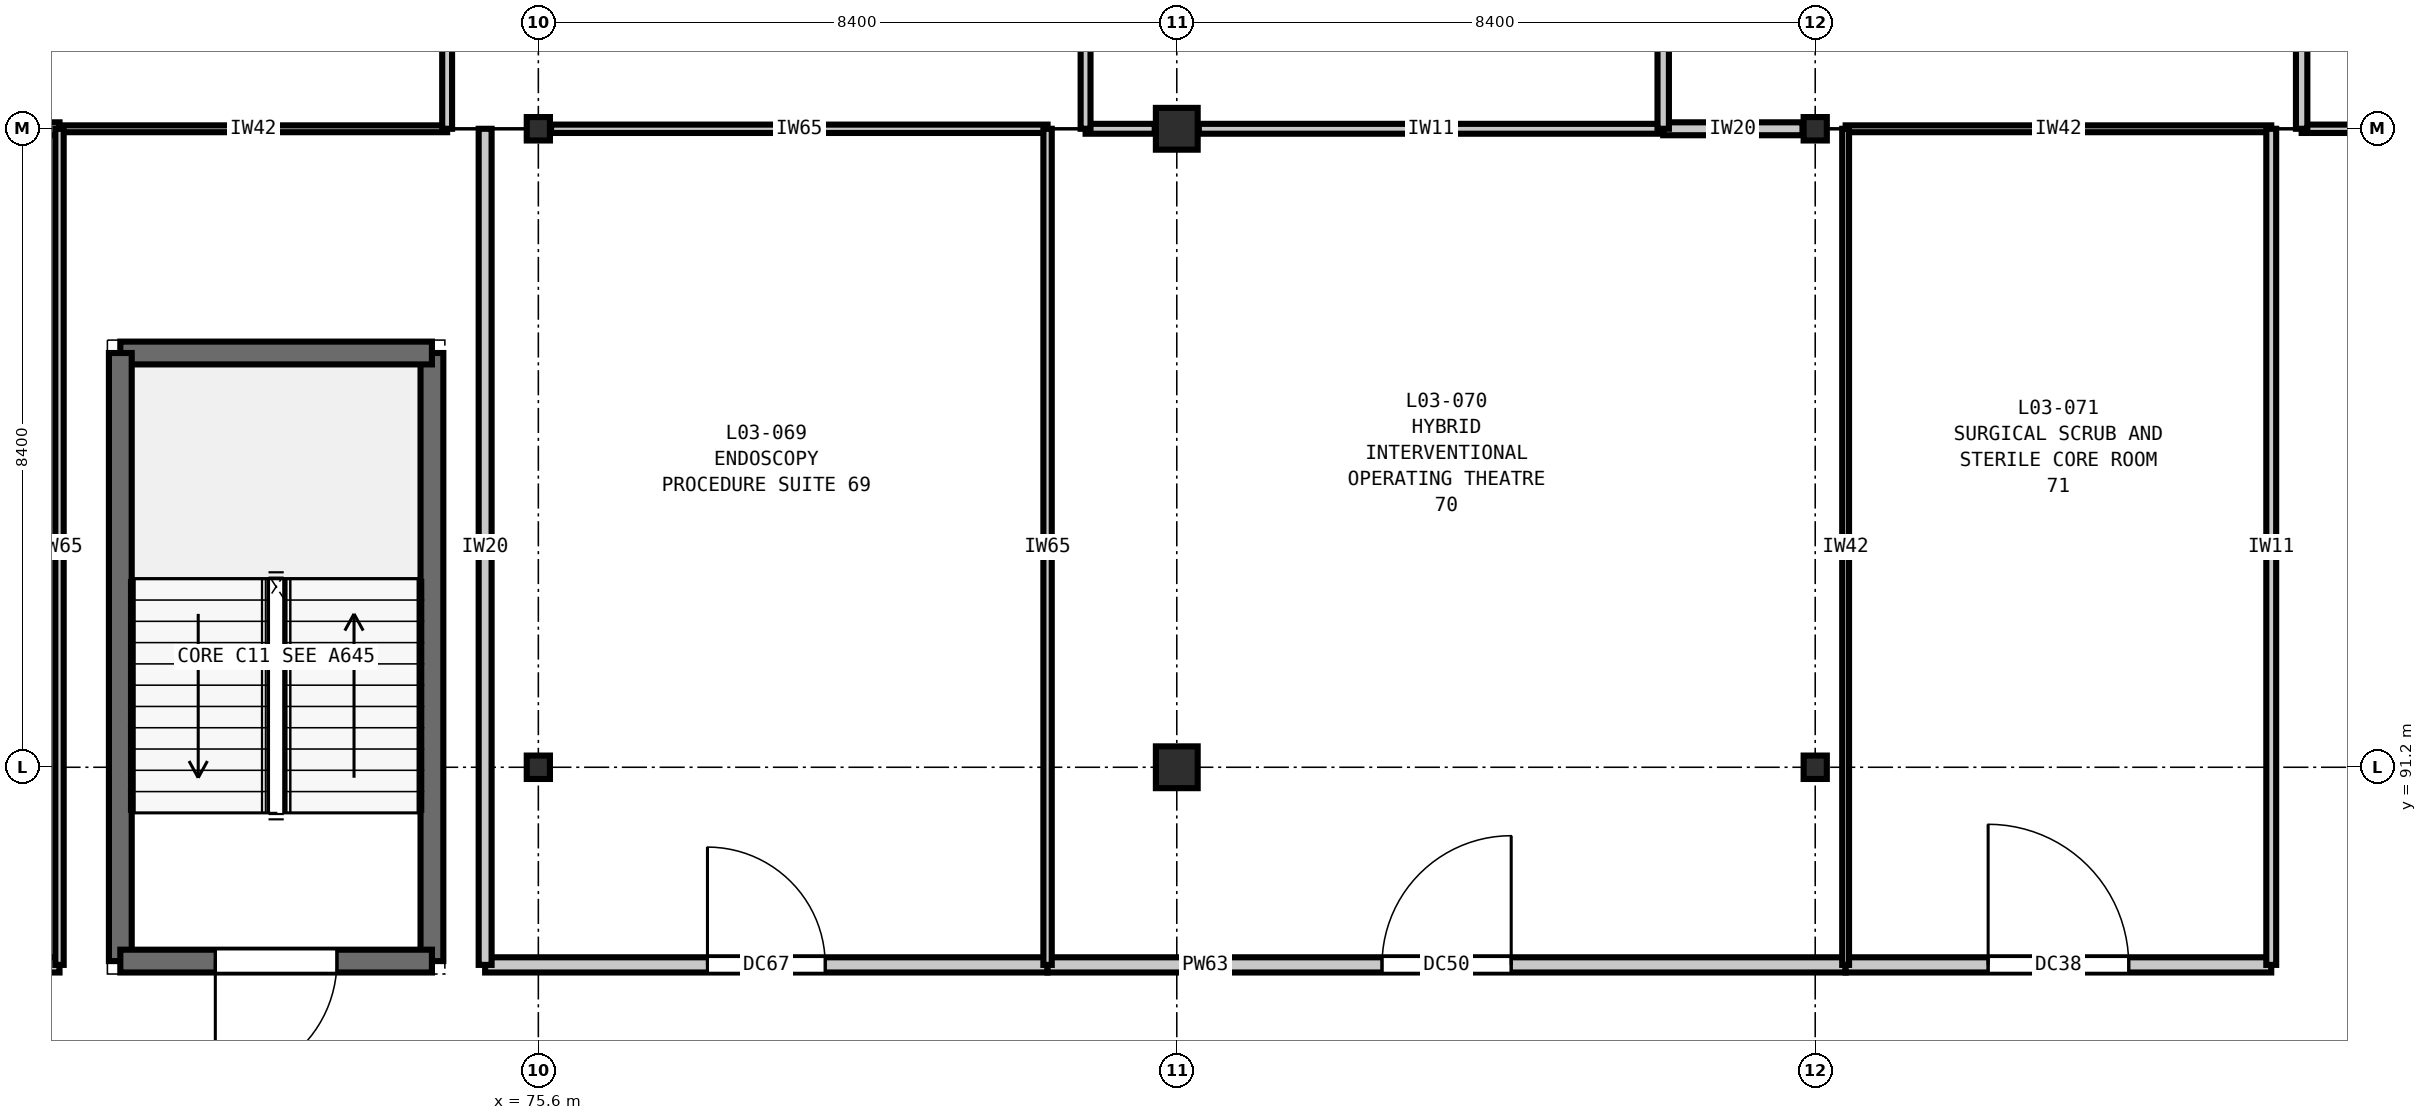
"""IFC4 building model, lengths in metres.
Left out: names, types, materials, properties, quantities, classifications, styles, units other than length and angle.
Written with IfcOpenShell. Run it as: python <this file> out.ifc"""

import sys

from ifc_helpers import new_model, si_unit, direction, frame, frame_2d, origin, origin_2d, place, context, subcontext, project, spatial, rectangle, i_section, extrude, element, fill, save


model = new_model("IFC4")
c1 = context("Model", 3, precision=1e-05, world=origin(), true_north=direction((0.0, 1.0)))
c2 = subcontext(c1, "Body", "Model", "MODEL_VIEW")
j1 = project(units=[si_unit("LENGTHUNIT", "METRE"), si_unit("PLANEANGLEUNIT", "RADIAN")], contexts=[c1])
p1 = place(None, origin())
s1 = spatial("IfcSite", under=j1, at=p1, CompositionType="ELEMENT")
p2 = place(p1, origin())
s2 = spatial("IfcBuilding", under=s1, at=p2, CompositionType="ELEMENT")
p3 = place(p2, frame((0.0, 0.0, 16.2)))
s3 = spatial("IfcBuildingStorey", under=s2, at=p3, CompositionType="ELEMENT", Elevation=16.2)
for number, where, z_axis, x_axis in (
    (1, (75.6, 91.2, 0.0), (0.0, 0.0, 1.0), (1.0, 0.0, 0.0)),
    (2, (75.6, 99.6, 0.0), (0.0, 0.0, 1.0), (1.0, 0.0, 0.0)),
):
    element("IfcColumn", number, at=place(p3, frame(where, z_axis=z_axis, x_axis=x_axis)), inside=s3, PredefinedType="COLUMN", context=c2, shape_type="SweptSolid", body=[
        extrude(i_section(OverallWidth=0.305, OverallDepth=0.308, WebThickness=0.01, FlangeThickness=0.015, FilletRadius=0.015, at=origin_2d()), origin(), (0.0, 0.0, 1.0), 4.2),
    ])
for number, where, z_axis, x_axis in (
    (3, (84.0, 91.2, 0.0), (0.0, 0.0, 1.0), (1.0, 0.0, 0.0)),
    (4, (84.0, 99.6, 0.0), (0.0, 0.0, 1.0), (1.0, 0.0, 0.0)),
):
    element("IfcColumn", number, at=place(p3, frame(where, z_axis=z_axis, x_axis=x_axis)), inside=s3, PredefinedType="COLUMN", context=c2, shape_type="SweptSolid", body=[
        extrude(rectangle(XDim=0.55, YDim=0.55, at=origin_2d()), origin(), (0.0, 0.0, 1.0), 4.2),
    ])
for number, where, z_axis, x_axis in (
    (5, (92.4, 91.2, 0.0), (0.0, 0.0, 1.0), (1.0, 0.0, 0.0)),
    (6, (92.4, 99.6, 0.0), (0.0, 0.0, 1.0), (1.0, 0.0, 0.0)),
):
    element("IfcColumn", number, at=place(p3, frame(where, z_axis=z_axis, x_axis=x_axis)), inside=s3, PredefinedType="COLUMN", context=c2, shape_type="SweptSolid", body=[
        extrude(i_section(OverallWidth=0.305, OverallDepth=0.308, WebThickness=0.01, FlangeThickness=0.015, FilletRadius=0.015, at=origin_2d()), origin(), (0.0, 0.0, 1.0), 4.2),
    ])
p4 = place(p3, frame((74.2, 88.65, 0.0), z_axis=(0.0, 0.0, 1.0), x_axis=(0.0, 1.0, 0.0)))
e7 = element("IfcWall", 7, at=p4, inside=s3, PredefinedType="SHEAR", context=c2, shape_type="SweptSolid", body=[
    extrude(rectangle(XDim=8.0, YDim=0.3, at=frame_2d((4.0, 0.0))), origin(), (0.0, 0.0, 1.0), 4.2),
])
p5 = place(p3, frame((74.2, 96.65, 0.0), z_axis=(0.0, 0.0, 1.0), x_axis=(-1.0, 0.0, 0.0)))
e8 = element("IfcWall", 8, at=p5, inside=s3, PredefinedType="SHEAR", context=c2, shape_type="SweptSolid", body=[
    extrude(rectangle(XDim=4.1, YDim=0.3, at=frame_2d((2.05, 0.0))), origin(), (0.0, 0.0, 1.0), 4.2),
])
p6 = place(p3, frame((70.1, 96.65, 0.0), z_axis=(0.0, 0.0, 1.0), x_axis=(0.0, -1.0, 0.0)))
e9 = element("IfcWall", 9, at=p6, inside=s3, PredefinedType="SHEAR", context=c2, shape_type="SweptSolid", body=[
    extrude(rectangle(XDim=8.0, YDim=0.3, at=frame_2d((4.0, 0.0))), origin(), (0.0, 0.0, 1.0), 4.2),
])
p7 = place(p3, frame((70.1, 88.65, 0.0), z_axis=(0.0, 0.0, 1.0), x_axis=(1.0, 0.0, 0.0)))
e10 = element("IfcWall", 10, at=p7, inside=s3, PredefinedType="SHEAR", context=c2, shape_type="SweptSolid", body=[
    extrude(rectangle(XDim=4.1, YDim=0.3, at=frame_2d((2.05, 0.0))), origin(), (0.0, 0.0, 1.0), 4.2),
])
p8 = place(p7, frame((1.25, 0.0, 0.0)))
e11 = element("IfcOpeningElement", 11, at=p8, cuts=e10, PredefinedType="OPENING", context=c2, shape_type="SweptSolid", body=[
    extrude(rectangle(XDim=1.6, YDim=2.25, at=frame_2d((0.8, 1.125))), frame((0.0, 0.16, 0.0), z_axis=(0.0, -1.0, 0.0), x_axis=(1.0, 0.0, 0.0)), (0.0, 0.0, 1.0), 0.32),
])
p9 = place(p3, frame((58.8, 88.6, 0.0), z_axis=(0.0, 0.0, 1.0), x_axis=(1.0, 0.0, 0.0)))
e12 = element("IfcWall", 12, at=p9, inside=s3, PredefinedType="PARTITIONING", context=c2, shape_type="SweptSolid", body=[
    extrude(rectangle(XDim=10.5, YDim=0.2, at=frame_2d((5.25, 0.0))), origin(), (0.0, 0.0, 1.0), 3.89),
])
p10 = place(p9, frame((4.525, 0.0, 0.0)))
e13 = element("IfcOpeningElement", 13, at=p10, cuts=e12, PredefinedType="OPENING", context=c2, shape_type="SweptSolid", body=[
    extrude(rectangle(XDim=1.45, YDim=2.25, at=frame_2d((0.725, 1.125))), frame((0.0, 0.11, 0.0), z_axis=(0.0, -1.0, 0.0), x_axis=(1.0, 0.0, 0.0)), (0.0, 0.0, 1.0), 0.22),
])
p11 = place(p3, frame((74.9, 88.6, 0.0), z_axis=(0.0, 0.0, 1.0), x_axis=(1.0, 0.0, 0.0)))
e14 = element("IfcWall", 14, at=p11, inside=s3, PredefinedType="PARTITIONING", context=c2, shape_type="SweptSolid", body=[
    extrude(rectangle(XDim=7.4, YDim=0.2, at=frame_2d((3.7, 0.0))), origin(), (0.0, 0.0, 1.0), 3.89),
])
p12 = place(p11, frame((2.925, 0.0, 0.0)))
e15 = element("IfcOpeningElement", 15, at=p12, cuts=e14, PredefinedType="OPENING", context=c2, shape_type="SweptSolid", body=[
    extrude(rectangle(XDim=1.55, YDim=2.25, at=frame_2d((0.775, 1.125))), frame((0.0, 0.11, 0.0), z_axis=(0.0, -1.0, 0.0), x_axis=(1.0, 0.0, 0.0)), (0.0, 0.0, 1.0), 0.22),
])
p13 = place(p3, frame((82.3, 88.6, 0.0), z_axis=(0.0, 0.0, 1.0), x_axis=(1.0, 0.0, 0.0)))
e16 = element("IfcWall", 16, at=p13, inside=s3, PredefinedType="PARTITIONING", context=c2, shape_type="SweptSolid", body=[
    extrude(rectangle(XDim=10.5, YDim=0.2, at=frame_2d((5.25, 0.0))), origin(), (0.0, 0.0, 1.0), 3.89),
])
p14 = place(p13, frame((4.4, 0.0, 0.0)))
e17 = element("IfcOpeningElement", 17, at=p14, cuts=e16, PredefinedType="OPENING", context=c2, shape_type="SweptSolid", body=[
    extrude(rectangle(XDim=1.7, YDim=2.3, at=frame_2d((0.85, 1.15))), frame((0.0, 0.11, 0.0), z_axis=(0.0, -1.0, 0.0), x_axis=(1.0, 0.0, 0.0)), (0.0, 0.0, 1.0), 0.22),
])
p15 = place(p3, frame((92.8, 88.6, 0.0), z_axis=(0.0, 0.0, 1.0), x_axis=(1.0, 0.0, 0.0)))
e18 = element("IfcWall", 18, at=p15, inside=s3, PredefinedType="PARTITIONING", context=c2, shape_type="SweptSolid", body=[
    extrude(rectangle(XDim=5.6, YDim=0.2, at=frame_2d((2.8, 0.0))), origin(), (0.0, 0.0, 1.0), 3.89),
])
p16 = place(p15, frame((1.875, 0.0, 0.0)))
e19 = element("IfcOpeningElement", 19, at=p16, cuts=e18, PredefinedType="OPENING", context=c2, shape_type="SweptSolid", body=[
    extrude(rectangle(XDim=1.85, YDim=2.3, at=frame_2d((0.925, 1.15))), frame((0.0, 0.11, 0.0), z_axis=(0.0, -1.0, 0.0), x_axis=(1.0, 0.0, 0.0)), (0.0, 0.0, 1.0), 0.22),
])
p17 = place(p3, frame((67.49, 99.6, 0.0), z_axis=(0.0, 0.0, 1.0), x_axis=(1.0, 0.0, 0.0)))
e20 = element("IfcWall", 20, at=p17, inside=s3, PredefinedType="PARTITIONING", context=c2, shape_type="SweptSolid", body=[
    extrude(rectangle(XDim=1.81, YDim=0.17, at=frame_2d((0.905, 0.0))), origin(), (0.0, 0.0, 1.0), 3.535),
])
p18 = place(p3, frame((69.3, 99.6, 0.0), z_axis=(0.0, 0.0, 1.0), x_axis=(1.0, 0.0, 0.0)))
e21 = element("IfcWall", 21, at=p18, inside=s3, PredefinedType="PARTITIONING", context=c2, shape_type="SweptSolid", body=[
    extrude(rectangle(XDim=5.1, YDim=0.09, at=frame_2d((2.55, 0.0))), origin(), (0.0, 0.0, 1.0), 3.535),
])
p19 = place(p3, frame((75.768, 99.6, 0.0), z_axis=(0.0, 0.0, 1.0), x_axis=(1.0, 0.0, 0.0)))
e22 = element("IfcWall", 22, at=p19, inside=s3, PredefinedType="PARTITIONING", context=c2, shape_type="SweptSolid", body=[
    extrude(rectangle(XDim=6.532, YDim=0.11, at=frame_2d((3.266, 0.0))), origin(), (0.0, 0.0, 1.0), 3.535),
])
p20 = place(p3, frame((84.29, 99.6, 0.0), z_axis=(0.0, 0.0, 1.0), x_axis=(1.0, 0.0, 0.0)))
e23 = element("IfcWall", 23, at=p20, inside=s3, PredefinedType="PARTITIONING", context=c2, shape_type="SweptSolid", body=[
    extrude(rectangle(XDim=6.11, YDim=0.13, at=frame_2d((3.055, 0.0))), origin(), (0.0, 0.0, 1.0), 3.535),
])
p21 = place(p3, frame((82.8, 99.6, 0.0), z_axis=(0.0, 0.0, 1.0), x_axis=(1.0, 0.0, 0.0)))
e24 = element("IfcWall", 24, at=p21, inside=s3, PredefinedType="PARTITIONING", context=c2, shape_type="SweptSolid", body=[
    extrude(rectangle(XDim=0.91, YDim=0.13, at=frame_2d((0.455, 0.0))), origin(), (0.0, 0.0, 1.0), 3.535),
])
p22 = place(p3, frame((90.4, 99.6, 0.0), z_axis=(0.0, 0.0, 1.0), x_axis=(1.0, 0.0, 0.0)))
e25 = element("IfcWall", 25, at=p22, inside=s3, PredefinedType="PARTITIONING", context=c2, shape_type="SweptSolid", body=[
    extrude(rectangle(XDim=1.833, YDim=0.17, at=frame_2d((0.916, 0.0))), origin(), (0.0, 0.0, 1.0), 3.535),
])
p23 = place(p3, frame((92.8, 99.6, 0.0), z_axis=(0.0, 0.0, 1.0), x_axis=(1.0, 0.0, 0.0)))
e26 = element("IfcWall", 26, at=p23, inside=s3, PredefinedType="PARTITIONING", context=c2, shape_type="SweptSolid", body=[
    extrude(rectangle(XDim=5.6, YDim=0.09, at=frame_2d((2.8, 0.0))), origin(), (0.0, 0.0, 1.0), 3.535),
])
p24 = place(p3, frame((98.8, 99.6, 0.0), z_axis=(0.0, 0.0, 1.0), x_axis=(1.0, 0.0, 0.0)))
e27 = element("IfcWall", 27, at=p24, inside=s3, PredefinedType="PARTITIONING", context=c2, shape_type="SweptSolid", body=[
    extrude(rectangle(XDim=1.71, YDim=0.11, at=frame_2d((0.855, 0.0))), origin(), (0.0, 0.0, 1.0), 3.535),
])
p25 = place(p3, frame((69.3, 88.6, 0.0), z_axis=(0.0, 0.0, 1.0), x_axis=(0.0, 1.0, 0.0)))
e28 = element("IfcWall", 28, at=p25, inside=s3, PredefinedType="PARTITIONING", context=c2, shape_type="SweptSolid", body=[
    extrude(rectangle(XDim=11.0, YDim=0.11, at=frame_2d((5.5, 0.0))), origin(), (0.0, 0.0, 1.0), 3.89),
])
p26 = place(p3, frame((74.4, 99.6, 0.0), z_axis=(0.0, 0.0, 1.0), x_axis=(0.0, 1.0, 0.0)))
e29 = element("IfcWall", 29, at=p26, inside=s3, PredefinedType="PARTITIONING", context=c2, shape_type="SweptSolid", body=[
    extrude(rectangle(XDim=3.6, YDim=0.13, at=frame_2d((1.8, 0.0))), origin(), (0.0, 0.0, 1.0), 3.89),
])
p27 = place(p3, frame((74.9, 88.6, 0.0), z_axis=(0.0, 0.0, 1.0), x_axis=(0.0, 1.0, 0.0)))
e30 = element("IfcWall", 30, at=p27, inside=s3, PredefinedType="PARTITIONING", context=c2, shape_type="SweptSolid", body=[
    extrude(rectangle(XDim=11.0, YDim=0.17, at=frame_2d((5.5, 0.0))), origin(), (0.0, 0.0, 1.0), 3.89),
])
p28 = place(p3, frame((82.3, 88.6, 0.0), z_axis=(0.0, 0.0, 1.0), x_axis=(0.0, 1.0, 0.0)))
e31 = element("IfcWall", 31, at=p28, inside=s3, PredefinedType="PARTITIONING", context=c2, shape_type="SweptSolid", body=[
    extrude(rectangle(XDim=11.0, YDim=0.11, at=frame_2d((5.5, 0.0))), origin(), (0.0, 0.0, 1.0), 3.89),
])
p29 = place(p3, frame((82.8, 99.6, 0.0), z_axis=(0.0, 0.0, 1.0), x_axis=(0.0, 1.0, 0.0)))
e32 = element("IfcWall", 32, at=p29, inside=s3, PredefinedType="PARTITIONING", context=c2, shape_type="SweptSolid", body=[
    extrude(rectangle(XDim=3.6, YDim=0.13, at=frame_2d((1.8, 0.0))), origin(), (0.0, 0.0, 1.0), 3.89),
])
p30 = place(p3, frame((90.4, 99.6, 0.0), z_axis=(0.0, 0.0, 1.0), x_axis=(0.0, 1.0, 0.0)))
e33 = element("IfcWall", 33, at=p30, inside=s3, PredefinedType="PARTITIONING", context=c2, shape_type="SweptSolid", body=[
    extrude(rectangle(XDim=3.6, YDim=0.15, at=frame_2d((1.8, 0.0))), origin(), (0.0, 0.0, 1.0), 3.89),
])
p31 = place(p3, frame((92.8, 88.6, 0.0), z_axis=(0.0, 0.0, 1.0), x_axis=(0.0, 1.0, 0.0)))
e34 = element("IfcWall", 34, at=p31, inside=s3, PredefinedType="PARTITIONING", context=c2, shape_type="SweptSolid", body=[
    extrude(rectangle(XDim=11.0, YDim=0.09, at=frame_2d((5.5, 0.0))), origin(), (0.0, 0.0, 1.0), 3.89),
])
p32 = place(p3, frame((98.4, 88.6, 0.0), z_axis=(0.0, 0.0, 1.0), x_axis=(0.0, 1.0, 0.0)))
e35 = element("IfcWall", 35, at=p32, inside=s3, PredefinedType="PARTITIONING", context=c2, shape_type="SweptSolid", body=[
    extrude(rectangle(XDim=11.0, YDim=0.13, at=frame_2d((5.5, 0.0))), origin(), (0.0, 0.0, 1.0), 3.89),
])
p33 = place(p3, frame((98.8, 99.6, 0.0), z_axis=(0.0, 0.0, 1.0), x_axis=(0.0, 1.0, 0.0)))
e36 = element("IfcWall", 36, at=p33, inside=s3, PredefinedType="PARTITIONING", context=c2, shape_type="SweptSolid", body=[
    extrude(rectangle(XDim=3.6, YDim=0.15, at=frame_2d((1.8, 0.0))), origin(), (0.0, 0.0, 1.0), 3.89),
])
p34 = place(p8, frame((1.6, 0.0, 0.0), z_axis=(0.0, 0.0, 1.0), x_axis=(-1.0, 0.0, 0.0)))
e37 = element("IfcDoor", 37, at=p34, inside=s3, OperationType="SINGLE_SWING_RIGHT", PredefinedType="DOOR", context=c2, shape_type="SweptSolid", body=[
    extrude(rectangle(XDim=1.6, YDim=2.25, at=frame_2d((0.8, 1.125))), frame((0.0, 0.025, 0.0), z_axis=(0.0, -1.0, 0.0), x_axis=(1.0, 0.0, 0.0)), (0.0, 0.0, 1.0), 0.05),
])
fill(e11, e37)
p35 = place(p12, origin())
e38 = element("IfcDoor", 38, at=p35, inside=s3, OperationType="SINGLE_SWING_LEFT", PredefinedType="DOOR", context=c2, shape_type="SweptSolid", body=[
    extrude(rectangle(XDim=1.55, YDim=2.25, at=frame_2d((0.775, 1.125))), frame((0.0, 0.025, 0.0), z_axis=(0.0, -1.0, 0.0), x_axis=(1.0, 0.0, 0.0)), (0.0, 0.0, 1.0), 0.05),
])
fill(e15, e38)
p36 = place(p14, origin())
e39 = element("IfcDoor", 39, at=p36, inside=s3, OperationType="SINGLE_SWING_RIGHT", PredefinedType="DOOR", context=c2, shape_type="SweptSolid", body=[
    extrude(rectangle(XDim=1.7, YDim=2.3, at=frame_2d((0.85, 1.15))), frame((0.0, 0.025, 0.0), z_axis=(0.0, -1.0, 0.0), x_axis=(1.0, 0.0, 0.0)), (0.0, 0.0, 1.0), 0.05),
])
fill(e17, e39)
p37 = place(p16, origin())
e40 = element("IfcDoor", 40, at=p37, inside=s3, OperationType="SINGLE_SWING_LEFT", PredefinedType="DOOR", context=c2, shape_type="SweptSolid", body=[
    extrude(rectangle(XDim=1.85, YDim=2.3, at=frame_2d((0.925, 1.15))), frame((0.0, 0.025, 0.0), z_axis=(0.0, -1.0, 0.0), x_axis=(1.0, 0.0, 0.0)), (0.0, 0.0, 1.0), 0.05),
])
fill(e19, e40)
save(model, sys.argv[1])
